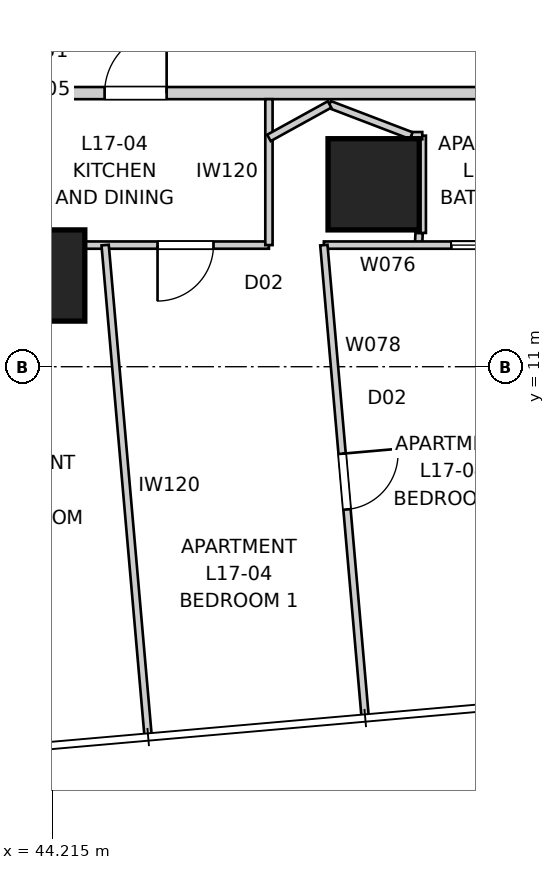
"""IFC4 building model, lengths in metres.
Left out: names, types, materials, properties, quantities, classifications, styles, units other than length and angle.
Written with IfcOpenShell. Run it as: python <this file> out.ifc"""

import sys

from ifc_helpers import new_model, si_unit, direction, frame, frame_2d, origin, origin_2d, place, context, subcontext, project, spatial, rectangle, extrude, element, fill, save


model = new_model("IFC4")
c1 = context("Model", 3, precision=1e-05, world=origin(), true_north=direction((0.0, 1.0)))
c2 = subcontext(c1, "Body", "Model", "MODEL_VIEW")
j1 = project(units=[si_unit("LENGTHUNIT", "METRE"), si_unit("PLANEANGLEUNIT", "RADIAN")], contexts=[c1])
p1 = place(None, origin())
s1 = spatial("IfcSite", under=j1, at=p1, CompositionType="ELEMENT")
p2 = place(p1, origin())
s2 = spatial("IfcBuilding", under=s1, at=p2, CompositionType="ELEMENT")
p3 = place(p2, frame((0.0, 0.0, 64.2)))
s3 = spatial("IfcBuildingStorey", under=s2, at=p3, CompositionType="ELEMENT", Elevation=64.2)
for number, where, z_axis, x_axis in (
    (1, (44.0, 12.5, 0.0), (0.0, 0.0, 1.0), (1.0, 0.0, 0.0)),
    (2, (49.5, 14.0, 0.0), (0.0, 0.0, 1.0), (1.0, 0.0, 0.0)),
):
    element("IfcColumn", number, at=place(p3, frame(where, z_axis=z_axis, x_axis=x_axis)), inside=s3, PredefinedType="COLUMN", context=c2, shape_type="SweptSolid", body=[
        extrude(rectangle(XDim=1.5, YDim=1.5, at=origin_2d()), origin(), (0.0, 0.0, 1.0), 3.4),
    ])
p4 = place(p3, frame((26.3, 15.5, 0.0), z_axis=(0.0, 0.0, 1.0), x_axis=(1.0, 0.0, 0.0)))
e3 = element("IfcWall", 3, at=p4, inside=s3, PredefinedType="PARTITIONING", context=c2, shape_type="SweptSolid", body=[
    extrude(rectangle(XDim=27.4, YDim=0.2, at=frame_2d((13.7, 0.0))), origin(), (0.0, 0.0, 1.0), 3.25),
])
p5 = place(p4, frame((18.776, 0.0, 0.0)))
e4 = element("IfcOpeningElement", 4, at=p5, cuts=e3, PredefinedType="OPENING", context=c2, shape_type="SweptSolid", body=[
    extrude(rectangle(XDim=1.02, YDim=2.34, at=frame_2d((0.51, 1.17))), frame((0.0, 0.11, 0.0), z_axis=(0.0, -1.0, 0.0), x_axis=(1.0, 0.0, 0.0)), (0.0, 0.0, 1.0), 0.22),
])
p6 = place(p4, frame((5.793, 0.0, 0.0)))
e5 = element("IfcOpeningElement", 5, at=p6, cuts=e3, PredefinedType="OPENING", context=c2, shape_type="SweptSolid", body=[
    extrude(rectangle(XDim=1.02, YDim=2.34, at=frame_2d((0.51, 1.17))), frame((0.0, 0.11, 0.0), z_axis=(0.0, -1.0, 0.0), x_axis=(1.0, 0.0, 0.0)), (0.0, 0.0, 1.0), 0.22),
])
p7 = place(p3, frame((47.778, 13.0, 0.0), z_axis=(0.0, 0.0, 1.0), x_axis=(-1.0, 0.0, 0.0)))
e6 = element("IfcWall", 6, at=p7, inside=s3, PredefinedType="PARTITIONING", context=c2, shape_type="SweptSolid", body=[
    extrude(rectangle(XDim=17.082, YDim=0.12, at=frame_2d((8.541, 0.0))), origin(), (0.0, 0.0, 1.0), 2.55),
])
p8 = place(p7, frame((0.912, 0.0, 0.0)))
e7 = element("IfcOpeningElement", 7, at=p8, cuts=e6, PredefinedType="OPENING", context=c2, shape_type="SweptSolid", body=[
    extrude(rectangle(XDim=0.92, YDim=2.34, at=frame_2d((0.46, 1.17))), frame((0.0, 0.07, 0.0), z_axis=(0.0, -1.0, 0.0), x_axis=(1.0, 0.0, 0.0)), (0.0, 0.0, 1.0), 0.14),
])
p9 = place(p7, frame((14.798, 0.0, 0.0)))
e8 = element("IfcOpeningElement", 8, at=p9, cuts=e6, PredefinedType="OPENING", context=c2, shape_type="SweptSolid", body=[
    extrude(rectangle(XDim=0.92, YDim=2.34, at=frame_2d((0.46, 1.17))), frame((0.0, 0.07, 0.0), z_axis=(0.0, -1.0, 0.0), x_axis=(1.0, 0.0, 0.0)), (0.0, 0.0, 1.0), 0.14),
])
p10 = place(p7, frame((4.858, 0.0, 0.0)))
e9 = element("IfcOpeningElement", 9, at=p10, cuts=e6, PredefinedType="OPENING", context=c2, shape_type="SweptSolid", body=[
    extrude(rectangle(XDim=0.96, YDim=2.1, at=frame_2d((0.48, 1.05))), frame((0.0, 0.07, 0.0), z_axis=(0.0, -1.0, 0.0), x_axis=(1.0, 0.0, 0.0)), (0.0, 0.0, 1.0), 0.14),
])
p11 = place(p7, frame((7.635, 0.0, 0.0)))
e10 = element("IfcOpeningElement", 10, at=p11, cuts=e6, PredefinedType="OPENING", context=c2, shape_type="SweptSolid", body=[
    extrude(rectangle(XDim=0.96, YDim=2.1, at=frame_2d((0.48, 1.05))), frame((0.0, 0.07, 0.0), z_axis=(0.0, -1.0, 0.0), x_axis=(1.0, 0.0, 0.0)), (0.0, 0.0, 1.0), 0.14),
])
p12 = place(p3, frame((47.778, 15.4, 0.0), z_axis=(0.0, 0.0, 1.0), x_axis=(0.0, -1.0, 0.0)))
e11 = element("IfcWall", 11, at=p12, inside=s3, PredefinedType="PARTITIONING", context=c2, shape_type="SweptSolid", body=[
    extrude(rectangle(XDim=2.4, YDim=0.12, at=frame_2d((1.2, 0.0))), origin(), (0.0, 0.0, 1.0), 3.25),
])
p13 = place(p3, frame((50.239, 13.0, 0.0), z_axis=(0.0, 0.0, 1.0), x_axis=(0.045131013234, 0.99898107672, 0.0)))
e12 = element("IfcWall", 12, at=p13, inside=s3, PredefinedType="PARTITIONING", context=c2, shape_type="SweptSolid", body=[
    extrude(rectangle(XDim=0.2, YDim=0.12, at=frame_2d((0.1, 0.0))), origin(), (0.0, 0.0, 1.0), 3.25),
])
p14 = place(p3, frame((50.3, 13.2, 0.0), z_axis=(0.0, 0.0, 1.0), x_axis=(0.0, 1.0, 0.0)))
e13 = element("IfcWall", 13, at=p14, inside=s3, PredefinedType="PARTITIONING", context=c2, shape_type="SweptSolid", body=[
    extrude(rectangle(XDim=1.6, YDim=0.12, at=frame_2d((0.8, 0.0))), origin(), (0.0, 0.0, 1.0), 3.25),
])
p15 = place(p3, frame((50.119, 14.8, 0.0), z_axis=(0.0, 0.0, 1.0), x_axis=(-0.934135067997, 0.356919703488, 0.0)))
e14 = element("IfcWall", 14, at=p15, inside=s3, PredefinedType="PARTITIONING", context=c2, shape_type="SweptSolid", body=[
    extrude(rectangle(XDim=1.438, YDim=0.12, at=frame_2d((0.719, 0.0))), origin(), (0.0, 0.0, 1.0), 3.25),
])
p16 = place(p3, frame((48.775, 15.313, 0.0), z_axis=(0.0, 0.0, 1.0), x_axis=(-0.875508887439, -0.483202015741, 0.0)))
e15 = element("IfcWall", 15, at=p16, inside=s3, PredefinedType="PARTITIONING", context=c2, shape_type="SweptSolid", body=[
    extrude(rectangle(XDim=1.139, YDim=0.12, at=frame_2d((0.569, 0.0))), origin(), (0.0, 0.0, 1.0), 3.25),
])
p17 = place(p3, frame((56.2, 13.0, 0.0), z_axis=(0.0, 0.0, 1.0), x_axis=(-1.0, 0.0, 0.0)))
e16 = element("IfcWall", 16, at=p17, inside=s3, PredefinedType="PARTITIONING", context=c2, shape_type="SweptSolid", body=[
    extrude(rectangle(XDim=7.519, YDim=0.12, at=frame_2d((3.759, 0.0))), origin(), (0.0, 0.0, 1.0), 3.25),
])
p18 = place(p17, frame((1.618, 0.0, 0.0)))
e17 = element("IfcOpeningElement", 17, at=p18, cuts=e16, PredefinedType="OPENING", context=c2, shape_type="SweptSolid", body=[
    extrude(rectangle(XDim=0.96, YDim=2.1, at=frame_2d((0.48, 1.05))), frame((0.0, 0.07, 0.0), z_axis=(0.0, -1.0, 0.0), x_axis=(1.0, 0.0, 0.0)), (0.0, 0.0, 1.0), 0.14),
])
p19 = place(p17, frame((4.461, 0.0, 0.0)))
e18 = element("IfcOpeningElement", 18, at=p19, cuts=e16, PredefinedType="OPENING", context=c2, shape_type="SweptSolid", body=[
    extrude(rectangle(XDim=0.96, YDim=2.1, at=frame_2d((0.48, 1.05))), frame((0.0, 0.07, 0.0), z_axis=(0.0, -1.0, 0.0), x_axis=(1.0, 0.0, 0.0)), (0.0, 0.0, 1.0), 0.14),
])
p20 = place(p3, frame((45.084, 13.0, 0.0), z_axis=(0.0, 0.0, 1.0), x_axis=(0.087184938313, -0.99619214338, 0.0)))
e19 = element("IfcWall", 19, at=p20, inside=s3, PredefinedType="PARTITIONING", context=c2, shape_type="SweptSolid", body=[
    extrude(rectangle(XDim=8.082, YDim=0.12, at=frame_2d((4.041, 0.0))), origin(), (0.0, 0.0, 1.0), 3.25),
])
p21 = place(p3, frame((48.681, 13.0, 0.0), z_axis=(0.0, 0.0, 1.0), x_axis=(0.0871517452, -0.996195047824, 0.0)))
e20 = element("IfcWall", 20, at=p21, inside=s3, PredefinedType="PARTITIONING", context=c2, shape_type="SweptSolid", body=[
    extrude(rectangle(XDim=7.768, YDim=0.12, at=frame_2d((3.884, 0.0))), origin(), (0.0, 0.0, 1.0), 3.25),
])
p22 = place(p21, frame((3.444, 0.0, 0.0)))
e21 = element("IfcOpeningElement", 21, at=p22, cuts=e20, PredefinedType="OPENING", context=c2, shape_type="SweptSolid", body=[
    extrude(rectangle(XDim=0.92, YDim=2.34, at=frame_2d((0.46, 1.17))), frame((0.0, 0.07, 0.0), z_axis=(0.0, -1.0, 0.0), x_axis=(1.0, 0.0, 0.0)), (0.0, 0.0, 1.0), 0.14),
])
p23 = place(p3, frame((50.3, 14.8, 0.0), z_axis=(0.0, 0.0, 1.0), x_axis=(-1.0, 0.0, 0.0)))
e22 = element("IfcWall", 22, at=p23, inside=s3, PredefinedType="PARTITIONING", context=c2, shape_type="SweptSolid", body=[
    extrude(rectangle(XDim=0.181, YDim=0.12, at=frame_2d((0.09, 0.0))), origin(), (0.0, 0.0, 1.0), 3.25),
])
p24 = place(p5, origin())
e23 = element("IfcDoor", 23, at=p24, inside=s3, OperationType="SINGLE_SWING_RIGHT", PredefinedType="DOOR", context=c2, shape_type="SweptSolid", body=[
    extrude(rectangle(XDim=1.02, YDim=2.34, at=frame_2d((0.51, 1.17))), frame((0.0, 0.025, 0.0), z_axis=(0.0, -1.0, 0.0), x_axis=(1.0, 0.0, 0.0)), (0.0, 0.0, 1.0), 0.05),
])
fill(e4, e23)
p25 = place(p8, origin())
e24 = element("IfcDoor", 24, at=p25, inside=s3, OperationType="SINGLE_SWING_RIGHT", PredefinedType="DOOR", context=c2, shape_type="SweptSolid", body=[
    extrude(rectangle(XDim=0.92, YDim=2.34, at=frame_2d((0.46, 1.17))), frame((0.0, 0.025, 0.0), z_axis=(0.0, -1.0, 0.0), x_axis=(1.0, 0.0, 0.0)), (0.0, 0.0, 1.0), 0.05),
])
fill(e7, e24)
p26 = place(p22, origin())
e25 = element("IfcDoor", 25, at=p26, inside=s3, OperationType="SINGLE_SWING_LEFT", PredefinedType="DOOR", context=c2, shape_type="SweptSolid", body=[
    extrude(rectangle(XDim=0.92, YDim=2.34, at=frame_2d((0.46, 1.17))), frame((0.0, 0.025, 0.0), z_axis=(0.0, -1.0, 0.0), x_axis=(1.0, 0.0, 0.0)), (0.0, 0.0, 1.0), 0.05),
])
fill(e21, e25)
p27 = place(p19, origin())
e26 = element("IfcDoor", 26, at=p27, inside=s3, OperationType="SLIDING_TO_LEFT", PredefinedType="DOOR", context=c2, shape_type="SweptSolid", body=[
    extrude(rectangle(XDim=0.96, YDim=2.1, at=frame_2d((0.48, 1.05))), frame((0.0, 0.025, 0.0), z_axis=(0.0, -1.0, 0.0), x_axis=(1.0, 0.0, 0.0)), (0.0, 0.0, 1.0), 0.05),
])
fill(e18, e26)
save(model, sys.argv[1])
